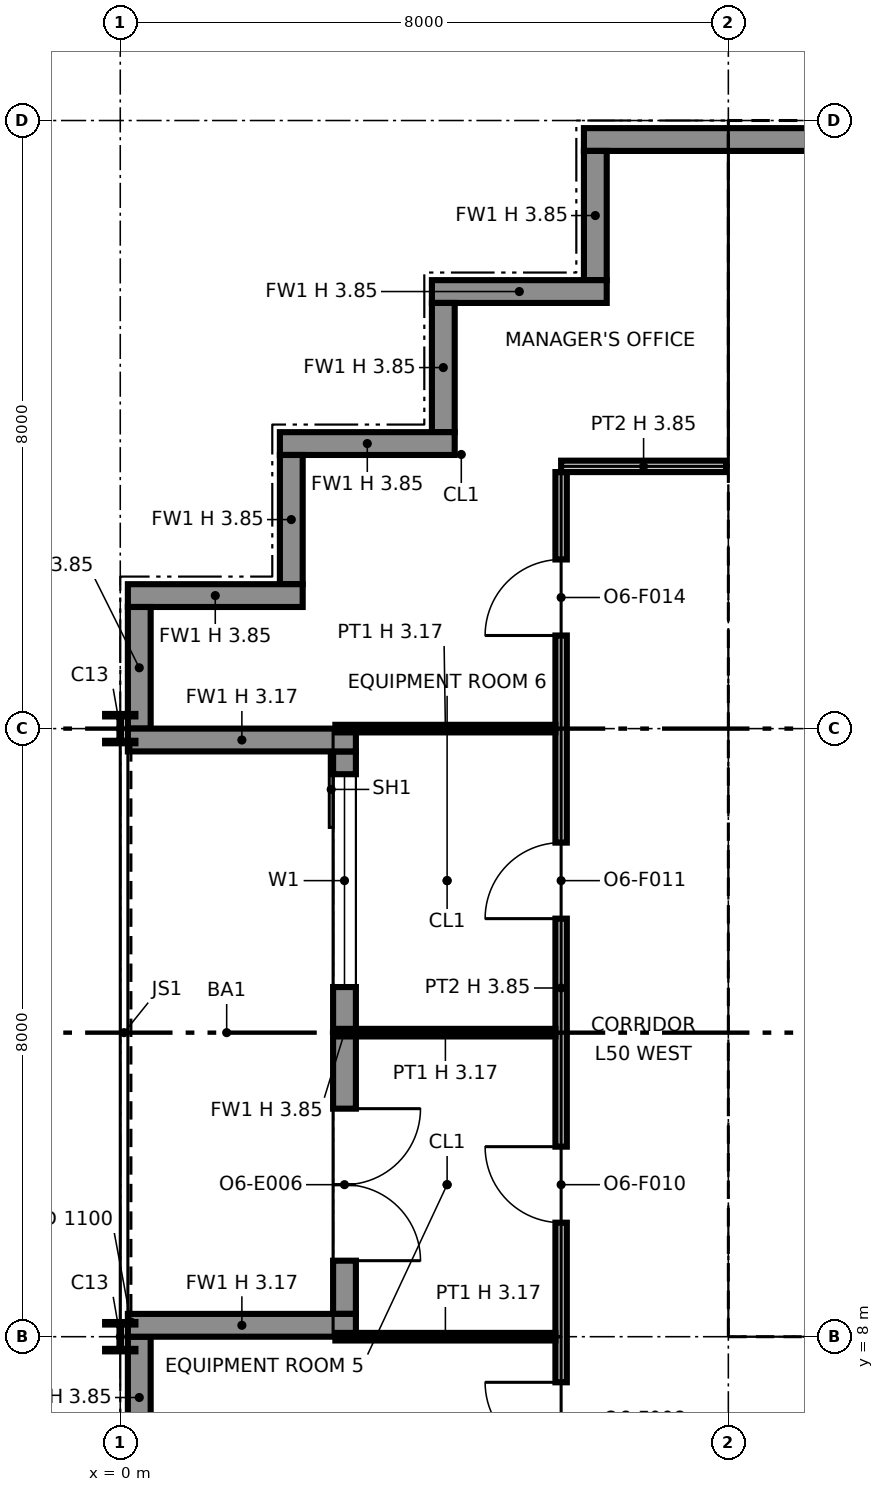
"""IFC4 building model, lengths in metres.
Left out: names, types, materials, properties, quantities, classifications, styles, units other than length and angle.
Written with IfcOpenShell. Run it as: python <this file> out.ifc"""

import sys

from ifc_helpers import new_model, si_unit, direction, frame, frame_2d, origin, origin_2d, place, context, subcontext, project, spatial, polyline, rectangle, i_section, outline, extrude, element, fill, save


model = new_model("IFC4")
c1 = context("Model", 3, precision=1e-05, world=origin(), true_north=direction((0.0, 1.0)))
c2 = subcontext(c1, "Body", "Model", "MODEL_VIEW")
j1 = project(units=[si_unit("LENGTHUNIT", "METRE"), si_unit("PLANEANGLEUNIT", "RADIAN")], contexts=[c1])
p1 = place(None, origin())
s1 = spatial("IfcSite", under=j1, at=p1, CompositionType="ELEMENT")
p2 = place(p1, origin())
s2 = spatial("IfcBuilding", under=s1, at=p2, CompositionType="ELEMENT")
p3 = place(p2, frame((0.0, 0.0, 233.0)))
s3 = spatial("IfcBuildingStorey", under=s2, at=p3, CompositionType="ELEMENT", Elevation=233.0)
for number, where, z_axis, x_axis in (
    (1, (0.0, 8.0, 0.0), (0.0, 0.0, 1.0), (1.0, 0.0, 0.0)),
    (2, (0.0, 16.0, 0.0), (0.0, 0.0, 1.0), (1.0, 0.0, 0.0)),
):
    element("IfcColumn", number, at=place(p3, frame(where, z_axis=z_axis, x_axis=x_axis)), inside=s3, PredefinedType="COLUMN", context=c2, shape_type="SweptSolid", body=[
        extrude(i_section(OverallWidth=0.399, OverallDepth=0.386, WebThickness=0.021, FlangeThickness=0.033, at=origin_2d()), origin(), (0.0, 0.0, 1.0), 3.85),
    ])
for number, where, z_axis, x_axis in (
    (3, (8.0, 8.0, 0.0), (0.0, 0.0, 1.0), (1.0, 0.0, 0.0)),
    (4, (8.0, 16.0, 0.0), (0.0, 0.0, 1.0), (1.0, 0.0, 0.0)),
):
    element("IfcColumn", number, at=place(p3, frame(where, z_axis=z_axis, x_axis=x_axis)), inside=s3, PredefinedType="COLUMN", context=c2, shape_type="SweptSolid", body=[
        extrude(i_section(OverallWidth=0.373, OverallDepth=0.368, WebThickness=0.015, FlangeThickness=0.024, at=origin_2d()), origin(), (0.0, 0.0, 1.0), 3.85),
    ])
p4 = place(p3, frame((8.0, 24.0, 0.0), z_axis=(0.0, 0.0, 1.0), x_axis=(1.0, 0.0, 0.0)))
e5 = element("IfcColumn", 5, at=p4, inside=s3, PredefinedType="COLUMN", context=c2, shape_type="SweptSolid", body=[
    extrude(i_section(OverallWidth=0.406, OverallDepth=0.417, WebThickness=0.03, FlangeThickness=0.048, at=origin_2d()), origin(), (0.0, 0.0, 1.0), 3.85),
])
p5 = place(p3, frame((32.0, 23.75, 0.0), z_axis=(0.0, 0.0, 1.0), x_axis=(-1.0, 0.0, 0.0)))
e6 = element("IfcWall", 6, at=p5, inside=s3, PredefinedType="SOLIDWALL", context=c2, shape_type="SweptSolid", body=[
    extrude(rectangle(XDim=25.9, YDim=0.3, at=frame_2d((12.95, 0.0))), origin(), (0.0, 0.0, 1.0), 3.85),
])
p6 = place(p3, frame((6.25, 23.6, 0.0), z_axis=(0.0, 0.0, 1.0), x_axis=(0.0, -1.0, 0.0)))
e7 = element("IfcWall", 7, at=p6, inside=s3, PredefinedType="SOLIDWALL", context=c2, shape_type="SweptSolid", body=[
    extrude(rectangle(XDim=1.7, YDim=0.3, at=frame_2d((0.85, 0.0))), origin(), (0.0, 0.0, 1.0), 3.85),
])
p7 = place(p3, frame((6.4, 21.75, 0.0), z_axis=(0.0, 0.0, 1.0), x_axis=(-1.0, 0.0, 0.0)))
e8 = element("IfcWall", 8, at=p7, inside=s3, PredefinedType="SOLIDWALL", context=c2, shape_type="SweptSolid", body=[
    extrude(rectangle(XDim=2.3, YDim=0.3, at=frame_2d((1.15, 0.0))), origin(), (0.0, 0.0, 1.0), 3.85),
])
p8 = place(p3, frame((4.25, 21.6, 0.0), z_axis=(0.0, 0.0, 1.0), x_axis=(0.0, -1.0, 0.0)))
e9 = element("IfcWall", 9, at=p8, inside=s3, PredefinedType="SOLIDWALL", context=c2, shape_type="SweptSolid", body=[
    extrude(rectangle(XDim=1.7, YDim=0.3, at=frame_2d((0.85, 0.0))), origin(), (0.0, 0.0, 1.0), 3.85),
])
p9 = place(p3, frame((4.4, 19.75, 0.0), z_axis=(0.0, 0.0, 1.0), x_axis=(-1.0, 0.0, 0.0)))
e10 = element("IfcWall", 10, at=p9, inside=s3, PredefinedType="SOLIDWALL", context=c2, shape_type="SweptSolid", body=[
    extrude(rectangle(XDim=2.3, YDim=0.3, at=frame_2d((1.15, 0.0))), origin(), (0.0, 0.0, 1.0), 3.85),
])
p10 = place(p3, frame((2.25, 19.6, 0.0), z_axis=(0.0, 0.0, 1.0), x_axis=(0.0, -1.0, 0.0)))
e11 = element("IfcWall", 11, at=p10, inside=s3, PredefinedType="SOLIDWALL", context=c2, shape_type="SweptSolid", body=[
    extrude(rectangle(XDim=1.7, YDim=0.3, at=frame_2d((0.85, 0.0))), origin(), (0.0, 0.0, 1.0), 3.85),
])
p11 = place(p3, frame((2.4, 17.75, 0.0), z_axis=(0.0, 0.0, 1.0), x_axis=(-1.0, 0.0, 0.0)))
e12 = element("IfcWall", 12, at=p11, inside=s3, PredefinedType="SOLIDWALL", context=c2, shape_type="SweptSolid", body=[
    extrude(rectangle(XDim=2.3, YDim=0.3, at=frame_2d((1.15, 0.0))), origin(), (0.0, 0.0, 1.0), 3.85),
])
p12 = place(p3, frame((0.25, 17.6, 0.0), z_axis=(0.0, 0.0, 1.0), x_axis=(0.0, -1.0, 0.0)))
e13 = element("IfcWall", 13, at=p12, inside=s3, PredefinedType="SOLIDWALL", context=c2, shape_type="SweptSolid", body=[
    extrude(rectangle(XDim=1.6, YDim=0.3, at=frame_2d((0.8, 0.0))), origin(), (0.0, 0.0, 1.0), 3.85),
])
p13 = place(p3, frame((2.95, 15.7, 0.0), z_axis=(0.0, 0.0, 1.0), x_axis=(0.0, -1.0, 0.0)))
e14 = element("IfcWall", 14, at=p13, inside=s3, PredefinedType="SOLIDWALL", context=c2, shape_type="SweptSolid", body=[
    extrude(rectangle(XDim=7.4, YDim=0.3, at=frame_2d((3.7, 0.0))), origin(), (0.0, 0.0, 1.0), 3.85),
])
p14 = place(p13, frame((0.3, 0.0, 0.9)))
e15 = element("IfcOpeningElement", 15, at=p14, cuts=e14, PredefinedType="OPENING", context=c2, shape_type="SweptSolid", body=[
    extrude(rectangle(XDim=2.8, YDim=2.2, at=frame_2d((1.4, 1.1))), frame((0.0, 0.16, 0.0), z_axis=(0.0, -1.0, 0.0), x_axis=(1.0, 0.0, 0.0)), (0.0, 0.0, 1.0), 0.32),
])
p15 = place(p13, frame((4.7, 0.0, 0.0)))
e16 = element("IfcOpeningElement", 16, at=p15, cuts=e14, PredefinedType="OPENING", context=c2, shape_type="SweptSolid", body=[
    extrude(rectangle(XDim=2.0, YDim=2.4, at=frame_2d((1.0, 1.2))), frame((0.0, 0.16, 0.0), z_axis=(0.0, -1.0, 0.0), x_axis=(1.0, 0.0, 0.0)), (0.0, 0.0, 1.0), 0.32),
])
for number, where, z_axis, x_axis in (
    (17, (0.1, 15.85, 0.0), (0.0, 0.0, 1.0), (1.0, 0.0, 0.0)),
    (18, (0.1, 8.15, 0.0), (0.0, 0.0, 1.0), (1.0, 0.0, 0.0)),
):
    element("IfcWall", number, at=place(p3, frame(where, z_axis=z_axis, x_axis=x_axis)), inside=s3, PredefinedType="SOLIDWALL", context=c2, shape_type="SweptSolid", body=[
        extrude(rectangle(XDim=3.0, YDim=0.3, at=frame_2d((1.5, 0.0))), origin(), (0.0, 0.0, 1.0), 3.171),
    ])
p16 = place(p3, frame((0.25, 8.0, 0.0), z_axis=(0.0, 0.0, 1.0), x_axis=(0.0, -1.0, 0.0)))
e19 = element("IfcWall", 19, at=p16, inside=s3, PredefinedType="SOLIDWALL", context=c2, shape_type="SweptSolid", body=[
    extrude(rectangle(XDim=1.6, YDim=0.3, at=frame_2d((0.8, 0.0))), origin(), (0.0, 0.0, 1.0), 3.85),
])
p17 = place(p3, frame((8.65, 8.75, 0.0), z_axis=(0.0, 0.0, 1.0), x_axis=(1.0, 0.0, 0.0)))
e20 = element("IfcWall", 20, at=p17, inside=s3, PredefinedType="PARTITIONING", context=c2, shape_type="SweptSolid", body=[
    extrude(outline(polyline([(0.0, 0.0), (14.7, 0.0), (14.7, 3.85), (7.438, 3.85), (7.438, 3.308), (7.262, 3.308), (7.261, 3.85), (0.0, 3.85), (0.0, 0.0)])), frame((0.0, 0.1, 0.0), z_axis=(0.0, -1.0, 0.0), x_axis=(1.0, 0.0, 0.0)), (0.0, 0.0, 1.0), 0.2),
])
p18 = place(p17, frame((1.3, 0.0, 0.0)))
e21 = element("IfcOpeningElement", 21, at=p18, cuts=e20, PredefinedType="OPENING", context=c2, shape_type="SweptSolid", body=[
    extrude(rectangle(XDim=1.4, YDim=2.1, at=frame_2d((0.7, 1.05))), frame((0.0, 0.11, 0.0), z_axis=(0.0, -1.0, 0.0), x_axis=(1.0, 0.0, 0.0)), (0.0, 0.0, 1.0), 0.22),
])
p19 = place(p17, frame((4.6, 0.0, 0.0)))
e22 = element("IfcOpeningElement", 22, at=p19, cuts=e20, PredefinedType="OPENING", context=c2, shape_type="SweptSolid", body=[
    extrude(rectangle(XDim=1.4, YDim=2.1, at=frame_2d((0.7, 1.05))), frame((0.0, 0.11, 0.0), z_axis=(0.0, -1.0, 0.0), x_axis=(1.0, 0.0, 0.0)), (0.0, 0.0, 1.0), 0.22),
])
p20 = place(p17, frame((10.4, 0.0, 0.0)))
e23 = element("IfcOpeningElement", 23, at=p20, cuts=e20, PredefinedType="OPENING", context=c2, shape_type="SweptSolid", body=[
    extrude(rectangle(XDim=1.2, YDim=2.1, at=frame_2d((0.6, 1.05))), frame((0.0, 0.11, 0.0), z_axis=(0.0, -1.0, 0.0), x_axis=(1.0, 0.0, 0.0)), (0.0, 0.0, 1.0), 0.22),
])
p21 = place(p3, frame((8.75, 8.85, 0.0), z_axis=(0.0, 0.0, 1.0), x_axis=(0.0, 1.0, 0.0)))
e24 = element("IfcWall", 24, at=p21, inside=s3, PredefinedType="PARTITIONING", context=c2, shape_type="SweptSolid", body=[
    extrude(outline(polyline([(0.0, 0.0), (14.3, 0.0), (14.3, 3.85), (10.225, 3.85), (10.224, 3.44), (10.076, 3.44), (10.075, 3.85), (7.239, 3.85), (7.238, 3.308), (7.062, 3.308), (7.062, 3.85), (0.0, 3.85), (0.0, 0.0)])), frame((0.0, 0.1, 0.0), z_axis=(0.0, -1.0, 0.0), x_axis=(1.0, 0.0, 0.0)), (0.0, 0.0, 1.0), 0.2),
])
p22 = place(p21, frame((8.3, 0.0, 0.0)))
e25 = element("IfcOpeningElement", 25, at=p22, cuts=e24, PredefinedType="OPENING", context=c2, shape_type="SweptSolid", body=[
    extrude(rectangle(XDim=1.8, YDim=2.1, at=frame_2d((0.9, 1.05))), frame((0.0, 0.11, 0.0), z_axis=(0.0, -1.0, 0.0), x_axis=(1.0, 0.0, 0.0)), (0.0, 0.0, 1.0), 0.22),
])
p23 = place(p3, frame((8.65, 23.25, 0.0), z_axis=(0.0, 0.0, 1.0), x_axis=(1.0, 0.0, 0.0)))
e26 = element("IfcWall", 26, at=p23, inside=s3, PredefinedType="PARTITIONING", context=c2, shape_type="SweptSolid", body=[
    extrude(outline(polyline([(0.0, 0.0), (14.7, 0.0), (14.7, 3.85), (7.438, 3.85), (7.438, 3.308), (7.262, 3.308), (7.261, 3.85), (0.0, 3.85), (0.0, 0.0)])), frame((0.0, 0.1, 0.0), z_axis=(0.0, -1.0, 0.0), x_axis=(1.0, 0.0, 0.0)), (0.0, 0.0, 1.0), 0.2),
])
p24 = place(p3, frame((8.85, 16.0, 0.0), z_axis=(0.0, 0.0, 1.0), x_axis=(1.0, 0.0, 0.0)))
e27 = element("IfcWall", 27, at=p24, inside=s3, PredefinedType="PARTITIONING", context=c2, shape_type="SweptSolid", body=[
    extrude(rectangle(XDim=6.953, YDim=0.6, at=frame_2d((3.477, 0.0))), origin(), (0.0, 0.0, 1.0), 3.308),
])
p25 = place(p3, frame((8.85, 19.9, 0.0), z_axis=(0.0, 0.0, 1.0), x_axis=(1.0, 0.0, 0.0)))
e28 = element("IfcWall", 28, at=p25, inside=s3, PredefinedType="PARTITIONING", context=c2, shape_type="SweptSolid", body=[
    extrude(outline(polyline([(0.0, 0.0), (14.3, 0.0), (14.3, 3.85), (7.239, 3.85), (7.238, 3.308), (7.062, 3.308), (7.062, 3.85), (0.0, 3.85), (0.0, 0.0)])), frame((0.0, 0.1, 0.0), z_axis=(0.0, -1.0, 0.0), x_axis=(1.0, 0.0, 0.0)), (0.0, 0.0, 1.0), 0.2),
])
p26 = place(p25, frame((2.125, 0.0, 0.0)))
e29 = element("IfcOpeningElement", 29, at=p26, cuts=e28, PredefinedType="OPENING", context=c2, shape_type="SweptSolid", body=[
    extrude(rectangle(XDim=0.9, YDim=2.1, at=frame_2d((0.45, 1.05))), frame((0.0, 0.11, 0.0), z_axis=(0.0, -1.0, 0.0), x_axis=(1.0, 0.0, 0.0)), (0.0, 0.0, 1.0), 0.22),
])
p27 = place(p25, frame((5.65, 0.0, 0.0)))
e30 = element("IfcOpeningElement", 30, at=p27, cuts=e28, PredefinedType="OPENING", context=c2, shape_type="SweptSolid", body=[
    extrude(rectangle(XDim=1.1, YDim=2.1, at=frame_2d((0.55, 1.05))), frame((0.0, 0.11, 0.0), z_axis=(0.0, -1.0, 0.0), x_axis=(1.0, 0.0, 0.0)), (0.0, 0.0, 1.0), 0.22),
])
p28 = place(p25, frame((7.95, 0.0, 0.0)))
e31 = element("IfcOpeningElement", 31, at=p28, cuts=e28, PredefinedType="OPENING", context=c2, shape_type="SweptSolid", body=[
    extrude(rectangle(XDim=1.1, YDim=2.1, at=frame_2d((0.55, 1.05))), frame((0.0, 0.11, 0.0), z_axis=(0.0, -1.0, 0.0), x_axis=(1.0, 0.0, 0.0)), (0.0, 0.0, 1.0), 0.22),
])
p29 = place(p25, frame((10.25, 0.0, 0.0)))
e32 = element("IfcOpeningElement", 32, at=p29, cuts=e28, PredefinedType="OPENING", context=c2, shape_type="SweptSolid", body=[
    extrude(rectangle(XDim=1.1, YDim=2.1, at=frame_2d((0.55, 1.05))), frame((0.0, 0.11, 0.0), z_axis=(0.0, -1.0, 0.0), x_axis=(1.0, 0.0, 0.0)), (0.0, 0.0, 1.0), 0.22),
])
p30 = place(p25, frame((12.625, 0.0, 0.0)))
e33 = element("IfcOpeningElement", 33, at=p30, cuts=e28, PredefinedType="OPENING", context=c2, shape_type="SweptSolid", body=[
    extrude(rectangle(XDim=1.1, YDim=2.1, at=frame_2d((0.55, 1.05))), frame((0.0, 0.11, 0.0), z_axis=(0.0, -1.0, 0.0), x_axis=(1.0, 0.0, 0.0)), (0.0, 0.0, 1.0), 0.22),
])
p31 = place(p3, frame((5.8, 5.8, 0.0), z_axis=(0.0, 0.0, 1.0), x_axis=(0.0, 1.0, 0.0)))
e34 = element("IfcWall", 34, at=p31, inside=s3, PredefinedType="PARTITIONING", context=c2, shape_type="SweptSolid", body=[
    extrude(outline(polyline([(0.0, 0.0), (13.575, 0.0), (13.575, 3.85), (10.5, 3.85), (10.498, 3.172), (9.902, 3.172), (9.9, 3.85), (6.5, 3.85), (6.498, 3.172), (5.902, 3.172), (5.9, 3.85), (2.5, 3.85), (2.498, 3.172), (1.902, 3.172), (1.9, 3.85), (0.0, 3.85), (0.0, 0.0)])), frame((0.0, 0.075, 0.0), z_axis=(0.0, -1.0, 0.0), x_axis=(1.0, 0.0, 0.0)), (0.0, 0.0, 1.0), 0.15),
])
p32 = place(p31, frame((0.6, 0.0, 0.0)))
e35 = element("IfcOpeningElement", 35, at=p32, cuts=e34, PredefinedType="OPENING", context=c2, shape_type="SweptSolid", body=[
    extrude(rectangle(XDim=1.0, YDim=2.1, at=frame_2d((0.5, 1.05))), frame((0.0, 0.085, 0.0), z_axis=(0.0, -1.0, 0.0), x_axis=(1.0, 0.0, 0.0)), (0.0, 0.0, 1.0), 0.17),
])
p33 = place(p31, frame((3.7, 0.0, 0.0)))
e36 = element("IfcOpeningElement", 36, at=p33, cuts=e34, PredefinedType="OPENING", context=c2, shape_type="SweptSolid", body=[
    extrude(rectangle(XDim=1.0, YDim=2.1, at=frame_2d((0.5, 1.05))), frame((0.0, 0.085, 0.0), z_axis=(0.0, -1.0, 0.0), x_axis=(1.0, 0.0, 0.0)), (0.0, 0.0, 1.0), 0.17),
])
p34 = place(p31, frame((7.7, 0.0, 0.0)))
e37 = element("IfcOpeningElement", 37, at=p34, cuts=e34, PredefinedType="OPENING", context=c2, shape_type="SweptSolid", body=[
    extrude(rectangle(XDim=1.0, YDim=2.1, at=frame_2d((0.5, 1.05))), frame((0.0, 0.085, 0.0), z_axis=(0.0, -1.0, 0.0), x_axis=(1.0, 0.0, 0.0)), (0.0, 0.0, 1.0), 0.17),
])
p35 = place(p31, frame((11.425, 0.0, 0.0)))
e38 = element("IfcOpeningElement", 38, at=p35, cuts=e34, PredefinedType="OPENING", context=c2, shape_type="SweptSolid", body=[
    extrude(rectangle(XDim=1.0, YDim=2.1, at=frame_2d((0.5, 1.05))), frame((0.0, 0.085, 0.0), z_axis=(0.0, -1.0, 0.0), x_axis=(1.0, 0.0, 0.0)), (0.0, 0.0, 1.0), 0.17),
])
for number, where, z_axis, x_axis in (
    (39, (2.83, 8.0, 0.0), (0.0, 0.0, 1.0), (1.0, 0.0, 0.0)),
    (40, (2.83, 12.0, 0.0), (0.0, 0.0, 1.0), (1.0, 0.0, 0.0)),
    (41, (2.83, 16.0, 0.0), (0.0, 0.0, 1.0), (1.0, 0.0, 0.0)),
):
    element("IfcWall", number, at=place(p3, frame(where, z_axis=z_axis, x_axis=x_axis)), inside=s3, PredefinedType="PARTITIONING", context=c2, shape_type="SweptSolid", body=[
        extrude(rectangle(XDim=2.895, YDim=0.1, at=frame_2d((1.448, 0.0))), origin(), (0.0, 0.0, 1.0), 3.172),
    ])
p36 = place(p3, frame((5.8, 19.45, 0.0), z_axis=(0.0, 0.0, 1.0), x_axis=(1.0, 0.0, 0.0)))
e42 = element("IfcWall", 42, at=p36, inside=s3, PredefinedType="PARTITIONING", context=c2, shape_type="SweptSolid", body=[
    extrude(rectangle(XDim=2.17, YDim=0.15, at=frame_2d((1.085, 0.0))), origin(), (0.0, 0.0, 1.0), 3.85),
])
p37 = place(p14, origin())
e43 = element("IfcWindow", 43, at=p37, inside=s3, PartitioningType="SINGLE_PANEL", PredefinedType="WINDOW", context=c2, shape_type="SweptSolid", body=[
    extrude(rectangle(XDim=2.8, YDim=2.2, at=frame_2d((1.4, 1.1))), frame((0.0, 0.03, 0.0), z_axis=(0.0, -1.0, 0.0), x_axis=(1.0, 0.0, 0.0)), (0.0, 0.0, 1.0), 0.06),
])
fill(e15, e43)
p38 = place(p15, origin())
e44 = element("IfcDoor", 44, at=p38, inside=s3, OperationType="DOUBLE_DOOR_SINGLE_SWING", PredefinedType="DOOR", context=c2, shape_type="SweptSolid", body=[
    extrude(rectangle(XDim=2.0, YDim=2.4, at=frame_2d((1.0, 1.2))), frame((0.0, 0.025, 0.0), z_axis=(0.0, -1.0, 0.0), x_axis=(1.0, 0.0, 0.0)), (0.0, 0.0, 1.0), 0.05),
])
fill(e16, e44)
p39 = place(p22, origin())
e45 = element("IfcDoor", 45, at=p39, inside=s3, OperationType="DOUBLE_DOOR_SINGLE_SWING", PredefinedType="NOTDEFINED", context=c2, shape_type="SweptSolid", body=[
    extrude(rectangle(XDim=1.8, YDim=2.1, at=frame_2d((0.9, 1.05))), frame((0.0, 0.025, 0.0), z_axis=(0.0, -1.0, 0.0), x_axis=(1.0, 0.0, 0.0)), (0.0, 0.0, 1.0), 0.05),
])
fill(e25, e45)
p40 = place(p32, origin())
e46 = element("IfcDoor", 46, at=p40, inside=s3, OperationType="SINGLE_SWING_RIGHT", PredefinedType="DOOR", context=c2, shape_type="SweptSolid", body=[
    extrude(rectangle(XDim=1.0, YDim=2.1, at=frame_2d((0.5, 1.05))), frame((0.0, 0.025, 0.0), z_axis=(0.0, -1.0, 0.0), x_axis=(1.0, 0.0, 0.0)), (0.0, 0.0, 1.0), 0.05),
])
fill(e35, e46)
p41 = place(p33, origin())
e47 = element("IfcDoor", 47, at=p41, inside=s3, OperationType="SINGLE_SWING_RIGHT", PredefinedType="DOOR", context=c2, shape_type="SweptSolid", body=[
    extrude(rectangle(XDim=1.0, YDim=2.1, at=frame_2d((0.5, 1.05))), frame((0.0, 0.025, 0.0), z_axis=(0.0, -1.0, 0.0), x_axis=(1.0, 0.0, 0.0)), (0.0, 0.0, 1.0), 0.05),
])
fill(e36, e47)
p42 = place(p34, origin())
e48 = element("IfcDoor", 48, at=p42, inside=s3, OperationType="SINGLE_SWING_LEFT", PredefinedType="DOOR", context=c2, shape_type="SweptSolid", body=[
    extrude(rectangle(XDim=1.0, YDim=2.1, at=frame_2d((0.5, 1.05))), frame((0.0, 0.025, 0.0), z_axis=(0.0, -1.0, 0.0), x_axis=(1.0, 0.0, 0.0)), (0.0, 0.0, 1.0), 0.05),
])
fill(e37, e48)
p43 = place(p35, origin())
e49 = element("IfcDoor", 49, at=p43, inside=s3, OperationType="SINGLE_SWING_LEFT", PredefinedType="DOOR", context=c2, shape_type="SweptSolid", body=[
    extrude(rectangle(XDim=1.0, YDim=2.1, at=frame_2d((0.5, 1.05))), frame((0.0, 0.025, 0.0), z_axis=(0.0, -1.0, 0.0), x_axis=(1.0, 0.0, 0.0)), (0.0, 0.0, 1.0), 0.05),
])
fill(e38, e49)
save(model, sys.argv[1])
